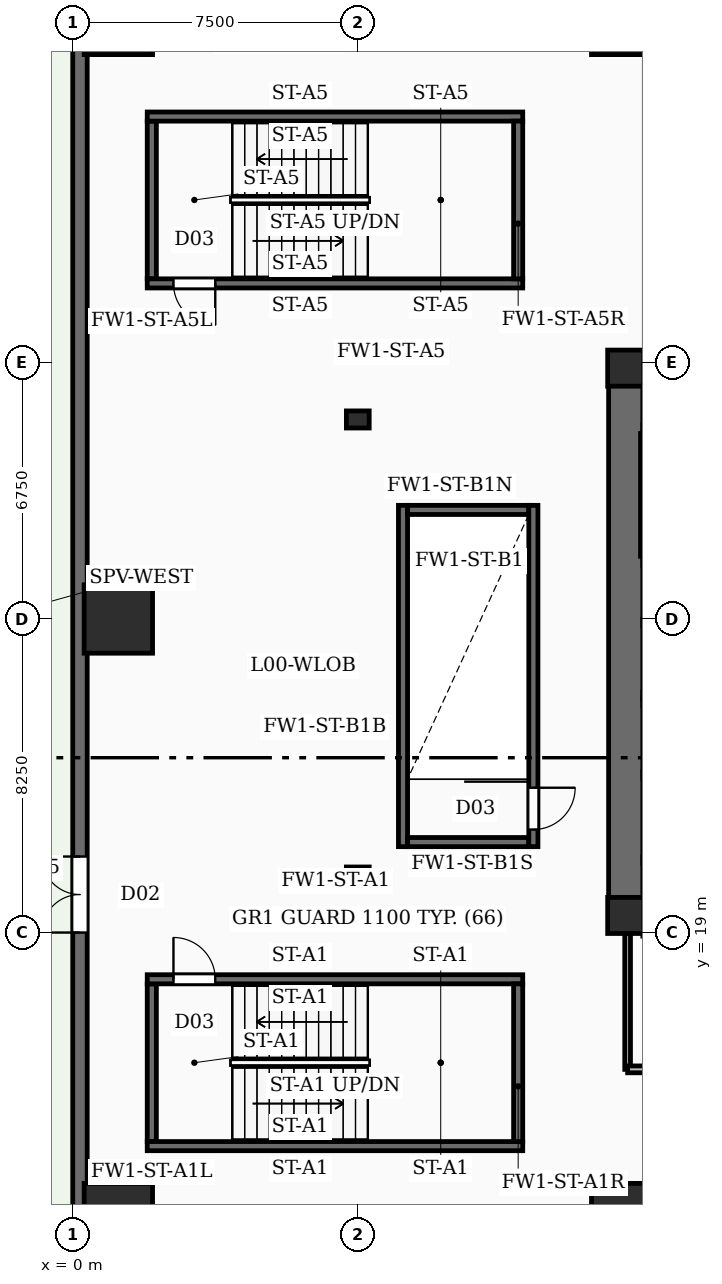
"""IFC4 building model, lengths in metres.
Left out: names, types, materials, properties, quantities, classifications, styles, units other than length and angle.
Written with IfcOpenShell. Run it as: python <this file> out.ifc"""

import sys

from ifc_helpers import new_model, si_unit, direction, frame, frame_2d, origin, origin_2d, place, context, subcontext, project, spatial, rectangle, circle, extrude, element, fill, save


model = new_model("IFC4")
c1 = context("Model", 3, precision=1e-05, world=origin(), true_north=direction((0.0, 1.0)))
c2 = subcontext(c1, "Body", "Model", "MODEL_VIEW")
j1 = project(units=[si_unit("LENGTHUNIT", "METRE"), si_unit("PLANEANGLEUNIT", "RADIAN")], contexts=[c1])
p1 = place(None, origin())
s1 = spatial("IfcSite", under=j1, at=p1, CompositionType="ELEMENT")
p2 = place(p1, origin())
s2 = spatial("IfcBuilding", under=s1, at=p2, CompositionType="ELEMENT")
p3 = place(p2, origin())
s3 = spatial("IfcBuildingStorey", under=s2, at=p3, CompositionType="ELEMENT", Elevation=0.0)
p4 = place(p3, frame((14.55, 19.0, -0.45), z_axis=(0.0, 0.0, 1.0), x_axis=(0.0, 1.0, 0.0)))
e1 = element("IfcWall", 1, at=p4, inside=s3, PredefinedType="SHEAR", context=c2, shape_type="SweptSolid", body=[
    extrude(rectangle(XDim=15.3, YDim=0.9, at=frame_2d((7.65, 0.0))), origin(), (0.0, 0.0, 1.0), 8.1),
])
for number, where, z_axis, x_axis in (
    (2, (14.55, 19.45, -0.45), (0.0, 0.0, 1.0), (1.0, 0.0, 0.0)),
    (3, (14.55, 33.85, -0.45), (0.0, 0.0, 1.0), (1.0, 0.0, 0.0)),
):
    element("IfcColumn", number, at=place(p3, frame(where, z_axis=z_axis, x_axis=x_axis)), inside=s3, PredefinedType="COLUMN", context=c2, shape_type="SweptSolid", body=[
        extrude(rectangle(XDim=0.95, YDim=0.95, at=origin_2d()), origin(), (0.0, 0.0, 1.0), 8.1),
    ])
for number, where, z_axis, x_axis in (
    (4, (1.2, 43.0, -0.45), (0.0, 0.0, 1.0), (1.0, 0.0, 0.0)),
    (5, (1.2, 27.25, -0.45), (0.0, 0.0, 1.0), (1.0, 0.0, 0.0)),
    (6, (1.2, 11.5, -0.45), (0.0, 0.0, 1.0), (1.0, 0.0, 0.0)),
):
    element("IfcColumn", number, at=place(p3, frame(where, z_axis=z_axis, x_axis=x_axis)), inside=s3, PredefinedType="COLUMN", context=c2, shape_type="SweptSolid", body=[
        extrude(circle(Radius=0.9, at=origin_2d()), origin(), (0.0, 0.0, 1.0), 8.1),
    ])
for number, where, z_axis, x_axis in (
    (7, (7.5, 20.5, -0.45), (0.0, 0.0, 1.0), (1.0, 0.0, 0.0)),
    (8, (7.5, 32.5, -0.45), (0.0, 0.0, 1.0), (1.0, 0.0, 0.0)),
):
    element("IfcColumn", number, at=place(p3, frame(where, z_axis=z_axis, x_axis=x_axis)), inside=s3, PredefinedType="PILASTER", context=c2, shape_type="SweptSolid", body=[
        extrude(rectangle(XDim=0.6, YDim=0.45, at=origin_2d()), origin(), (0.0, 0.0, 1.0), 8.1),
    ])
for number, where, z_axis, x_axis in (
    (9, (14.55, 11.5, -0.45), (0.0, 0.0, 1.0), (1.0, 0.0, 0.0)),
    (10, (14.55, 43.0, -0.45), (0.0, 0.0, 1.0), (1.0, 0.0, 0.0)),
):
    element("IfcColumn", number, at=place(p3, frame(where, z_axis=z_axis, x_axis=x_axis)), inside=s3, PredefinedType="COLUMN", context=c2, shape_type="SweptSolid", body=[
        extrude(circle(Radius=0.9, at=origin_2d()), origin(), (0.0, 0.0, 1.0), 8.1),
    ])
p5 = place(p3, frame((0.19, 5.4, 0.0), z_axis=(0.0, 0.0, 1.0), x_axis=(0.0, 1.0, 0.0)))
e11 = element("IfcWall", 11, at=p5, inside=s3, PredefinedType="SOLIDWALL", context=c2, shape_type="SweptSolid", body=[
    extrude(rectangle(XDim=43.7, YDim=0.38, at=frame_2d((21.85, 0.0))), origin(), (0.0, 0.0, 1.0), 7.65),
])
p6 = place(p5, frame((13.6, 0.0, 0.0)))
e12 = element("IfcOpeningElement", 12, at=p6, cuts=e11, PredefinedType="OPENING", context=c2, shape_type="SweptSolid", body=[
    extrude(rectangle(XDim=2.0, YDim=2.3, at=frame_2d((1.0, 1.15))), frame((0.0, 0.2, 0.0), z_axis=(0.0, -1.0, 0.0), x_axis=(1.0, 0.0, 0.0)), (0.0, 0.0, 1.0), 0.4),
])
p7 = place(p3, frame((1.96, 17.77, 0.0), z_axis=(0.0, 0.0, 1.0), x_axis=(1.0, 0.0, 0.0)))
e13 = element("IfcWall", 13, at=p7, inside=s3, PredefinedType="SOLIDWALL", context=c2, shape_type="SweptSolid", body=[
    extrude(rectangle(XDim=9.88, YDim=0.24, at=frame_2d((4.94, 0.0))), origin(), (0.0, 0.0, 1.0), 7.65),
])
p8 = place(p7, frame((0.69, 0.0, 0.0)))
e14 = element("IfcOpeningElement", 14, at=p8, cuts=e13, PredefinedType="OPENING", context=c2, shape_type="SweptSolid", body=[
    extrude(rectangle(XDim=1.1, YDim=2.15, at=frame_2d((0.55, 1.075))), frame((0.0, 0.13, 0.0), z_axis=(0.0, -1.0, 0.0), x_axis=(1.0, 0.0, 0.0)), (0.0, 0.0, 1.0), 0.26),
])
p9 = place(p3, frame((1.96, 13.38, 0.0), z_axis=(0.0, 0.0, 1.0), x_axis=(1.0, 0.0, 0.0)))
e15 = element("IfcWall", 15, at=p9, inside=s3, PredefinedType="SOLIDWALL", context=c2, shape_type="SweptSolid", body=[
    extrude(rectangle(XDim=9.88, YDim=0.24, at=frame_2d((4.94, 0.0))), origin(), (0.0, 0.0, 1.0), 7.65),
])
for number, where, z_axis, x_axis in (
    (16, (2.08, 13.5, 0.0), (0.0, 0.0, 1.0), (0.0, 1.0, 0.0)),
    (17, (11.72, 13.5, 0.0), (0.0, 0.0, 1.0), (0.0, 1.0, 0.0)),
):
    element("IfcWall", number, at=place(p3, frame(where, z_axis=z_axis, x_axis=x_axis)), inside=s3, PredefinedType="SOLIDWALL", context=c2, shape_type="SweptSolid", body=[
        extrude(rectangle(XDim=4.15, YDim=0.24, at=frame_2d((2.075, 0.0))), origin(), (0.0, 0.0, 1.0), 7.65),
    ])
p10 = place(p3, frame((11.84, 36.08, 0.0), z_axis=(0.0, 0.0, 1.0), x_axis=(-1.0, 0.0, 0.0)))
e18 = element("IfcWall", 18, at=p10, inside=s3, PredefinedType="SOLIDWALL", context=c2, shape_type="SweptSolid", body=[
    extrude(rectangle(XDim=9.88, YDim=0.24, at=frame_2d((4.94, 0.0))), origin(), (0.0, 0.0, 1.0), 7.65),
])
p11 = place(p10, frame((8.09, 0.0, 0.0)))
e19 = element("IfcOpeningElement", 19, at=p11, cuts=e18, PredefinedType="OPENING", context=c2, shape_type="SweptSolid", body=[
    extrude(rectangle(XDim=1.1, YDim=2.15, at=frame_2d((0.55, 1.075))), frame((0.0, 0.13, 0.0), z_axis=(0.0, -1.0, 0.0), x_axis=(1.0, 0.0, 0.0)), (0.0, 0.0, 1.0), 0.26),
])
p12 = place(p3, frame((1.96, 40.47, 0.0), z_axis=(0.0, 0.0, 1.0), x_axis=(1.0, 0.0, 0.0)))
e20 = element("IfcWall", 20, at=p12, inside=s3, PredefinedType="SOLIDWALL", context=c2, shape_type="SweptSolid", body=[
    extrude(rectangle(XDim=9.88, YDim=0.24, at=frame_2d((4.94, 0.0))), origin(), (0.0, 0.0, 1.0), 7.65),
])
for number, where, z_axis, x_axis in (
    (21, (2.08, 36.2, 0.0), (0.0, 0.0, 1.0), (0.0, 1.0, 0.0)),
    (22, (11.72, 36.2, 0.0), (0.0, 0.0, 1.0), (0.0, 1.0, 0.0)),
):
    element("IfcWall", number, at=place(p3, frame(where, z_axis=z_axis, x_axis=x_axis)), inside=s3, PredefinedType="SOLIDWALL", context=c2, shape_type="SweptSolid", body=[
        extrude(rectangle(XDim=4.15, YDim=0.24, at=frame_2d((2.075, 0.0))), origin(), (0.0, 0.0, 1.0), 7.65),
    ])
p13 = place(p3, frame((12.12, 30.24, 0.0), z_axis=(0.0, 0.0, 1.0), x_axis=(0.0, -1.0, 0.0)))
e23 = element("IfcWall", 23, at=p13, inside=s3, PredefinedType="SOLIDWALL", context=c2, shape_type="SweptSolid", body=[
    extrude(rectangle(XDim=8.98, YDim=0.24, at=frame_2d((4.49, 0.0))), origin(), (0.0, 0.0, 1.0), 7.65),
])
p14 = place(p13, frame((7.43, 0.0, 0.0)))
e24 = element("IfcOpeningElement", 24, at=p14, cuts=e23, PredefinedType="OPENING", context=c2, shape_type="SweptSolid", body=[
    extrude(rectangle(XDim=1.1, YDim=2.15, at=frame_2d((0.55, 1.075))), frame((0.0, 0.13, 0.0), z_axis=(0.0, -1.0, 0.0), x_axis=(1.0, 0.0, 0.0)), (0.0, 0.0, 1.0), 0.26),
])
p15 = place(p3, frame((8.69, 21.26, 0.0), z_axis=(0.0, 0.0, 1.0), x_axis=(0.0, 1.0, 0.0)))
e25 = element("IfcWall", 25, at=p15, inside=s3, PredefinedType="SOLIDWALL", context=c2, shape_type="SweptSolid", body=[
    extrude(rectangle(XDim=8.98, YDim=0.24, at=frame_2d((4.49, 0.0))), origin(), (0.0, 0.0, 1.0), 7.65),
])
for number, where, z_axis, x_axis in (
    (26, (8.81, 21.38, 0.0), (0.0, 0.0, 1.0), (1.0, 0.0, 0.0)),
    (27, (8.81, 30.12, 0.0), (0.0, 0.0, 1.0), (1.0, 0.0, 0.0)),
):
    element("IfcWall", number, at=place(p3, frame(where, z_axis=z_axis, x_axis=x_axis)), inside=s3, PredefinedType="SOLIDWALL", context=c2, shape_type="SweptSolid", body=[
        extrude(rectangle(XDim=3.19, YDim=0.24, at=frame_2d((1.595, 0.0))), origin(), (0.0, 0.0, 1.0), 7.65),
    ])
p16 = place(p3, frame((15.06, 28.9, 0.0), z_axis=(0.0, 0.0, 1.0), x_axis=(0.0, 1.0, 0.0)))
e28 = element("IfcWall", 28, at=p16, inside=s3, PredefinedType="SOLIDWALL", context=c2, shape_type="SweptSolid", body=[
    extrude(rectangle(XDim=3.23, YDim=0.24, at=frame_2d((1.615, 0.0))), origin(), (0.0, 0.0, 1.0), 7.65),
])
p17 = place(p3, frame((14.6, 15.4, 0.0), z_axis=(0.0, 0.0, 1.0), x_axis=(1.0, 0.0, 0.0)))
e29 = element("IfcWall", 29, at=p17, inside=s3, PredefinedType="PARTITIONING", context=c2, shape_type="SweptSolid", body=[
    extrude(rectangle(XDim=9.9, YDim=0.18, at=frame_2d((4.95, 0.0))), origin(), (0.0, 0.0, 1.0), 6.71),
])
p18 = place(p17, frame((0.74, 0.0, 0.0)))
e30 = element("IfcOpeningElement", 30, at=p18, cuts=e29, PredefinedType="OPENING", context=c2, shape_type="SweptSolid", body=[
    extrude(rectangle(XDim=0.92, YDim=2.1, at=frame_2d((0.46, 1.05))), frame((0.0, 0.1, 0.0), z_axis=(0.0, -1.0, 0.0), x_axis=(1.0, 0.0, 0.0)), (0.0, 0.0, 1.0), 0.2),
])
p19 = place(p17, frame((3.19, 0.0, 0.0)))
e31 = element("IfcOpeningElement", 31, at=p19, cuts=e29, PredefinedType="OPENING", context=c2, shape_type="SweptSolid", body=[
    extrude(rectangle(XDim=0.92, YDim=2.1, at=frame_2d((0.46, 1.05))), frame((0.0, 0.1, 0.0), z_axis=(0.0, -1.0, 0.0), x_axis=(1.0, 0.0, 0.0)), (0.0, 0.0, 1.0), 0.2),
])
p20 = place(p17, frame((5.69, 0.0, 0.0)))
e32 = element("IfcOpeningElement", 32, at=p20, cuts=e29, PredefinedType="OPENING", context=c2, shape_type="SweptSolid", body=[
    extrude(rectangle(XDim=0.92, YDim=2.1, at=frame_2d((0.46, 1.05))), frame((0.0, 0.1, 0.0), z_axis=(0.0, -1.0, 0.0), x_axis=(1.0, 0.0, 0.0)), (0.0, 0.0, 1.0), 0.2),
])
p21 = place(p17, frame((8.19, 0.0, 0.0)))
e33 = element("IfcOpeningElement", 33, at=p21, cuts=e29, PredefinedType="OPENING", context=c2, shape_type="SweptSolid", body=[
    extrude(rectangle(XDim=0.92, YDim=2.1, at=frame_2d((0.46, 1.05))), frame((0.0, 0.1, 0.0), z_axis=(0.0, -1.0, 0.0), x_axis=(1.0, 0.0, 0.0)), (0.0, 0.0, 1.0), 0.2),
])
p22 = place(p3, frame((14.6, 15.4, 0.0), z_axis=(0.0, 0.0, 1.0), x_axis=(0.0, 1.0, 0.0)))
e34 = element("IfcWall", 34, at=p22, inside=s3, PredefinedType="PARTITIONING", context=c2, shape_type="SweptSolid", body=[
    extrude(rectangle(XDim=3.58, YDim=0.15, at=frame_2d((1.79, 0.0))), origin(), (0.0, 0.0, 1.0), 6.71),
])
p23 = place(p6, origin())
e35 = element("IfcDoor", 35, at=p23, inside=s3, OperationType="DOUBLE_DOOR_SINGLE_SWING", PredefinedType="DOOR", context=c2, shape_type="SweptSolid", body=[
    extrude(rectangle(XDim=2.0, YDim=2.3, at=frame_2d((1.0, 1.15))), frame((0.0, 0.025, 0.0), z_axis=(0.0, -1.0, 0.0), x_axis=(1.0, 0.0, 0.0)), (0.0, 0.0, 1.0), 0.05),
])
fill(e12, e35)
p24 = place(p8, origin())
e36 = element("IfcDoor", 36, at=p24, inside=s3, OperationType="SINGLE_SWING_LEFT", PredefinedType="DOOR", context=c2, shape_type="SweptSolid", body=[
    extrude(rectangle(XDim=1.1, YDim=2.15, at=frame_2d((0.55, 1.075))), frame((0.0, 0.025, 0.0), z_axis=(0.0, -1.0, 0.0), x_axis=(1.0, 0.0, 0.0)), (0.0, 0.0, 1.0), 0.05),
])
fill(e14, e36)
p25 = place(p11, origin())
e37 = element("IfcDoor", 37, at=p25, inside=s3, OperationType="SINGLE_SWING_LEFT", PredefinedType="DOOR", context=c2, shape_type="SweptSolid", body=[
    extrude(rectangle(XDim=1.1, YDim=2.15, at=frame_2d((0.55, 1.075))), frame((0.0, 0.025, 0.0), z_axis=(0.0, -1.0, 0.0), x_axis=(1.0, 0.0, 0.0)), (0.0, 0.0, 1.0), 0.05),
])
fill(e19, e37)
p26 = place(p14, origin())
e38 = element("IfcDoor", 38, at=p26, inside=s3, OperationType="SINGLE_SWING_LEFT", PredefinedType="DOOR", context=c2, shape_type="SweptSolid", body=[
    extrude(rectangle(XDim=1.1, YDim=2.15, at=frame_2d((0.55, 1.075))), frame((0.0, 0.025, 0.0), z_axis=(0.0, -1.0, 0.0), x_axis=(1.0, 0.0, 0.0)), (0.0, 0.0, 1.0), 0.05),
])
fill(e24, e38)
save(model, sys.argv[1])
